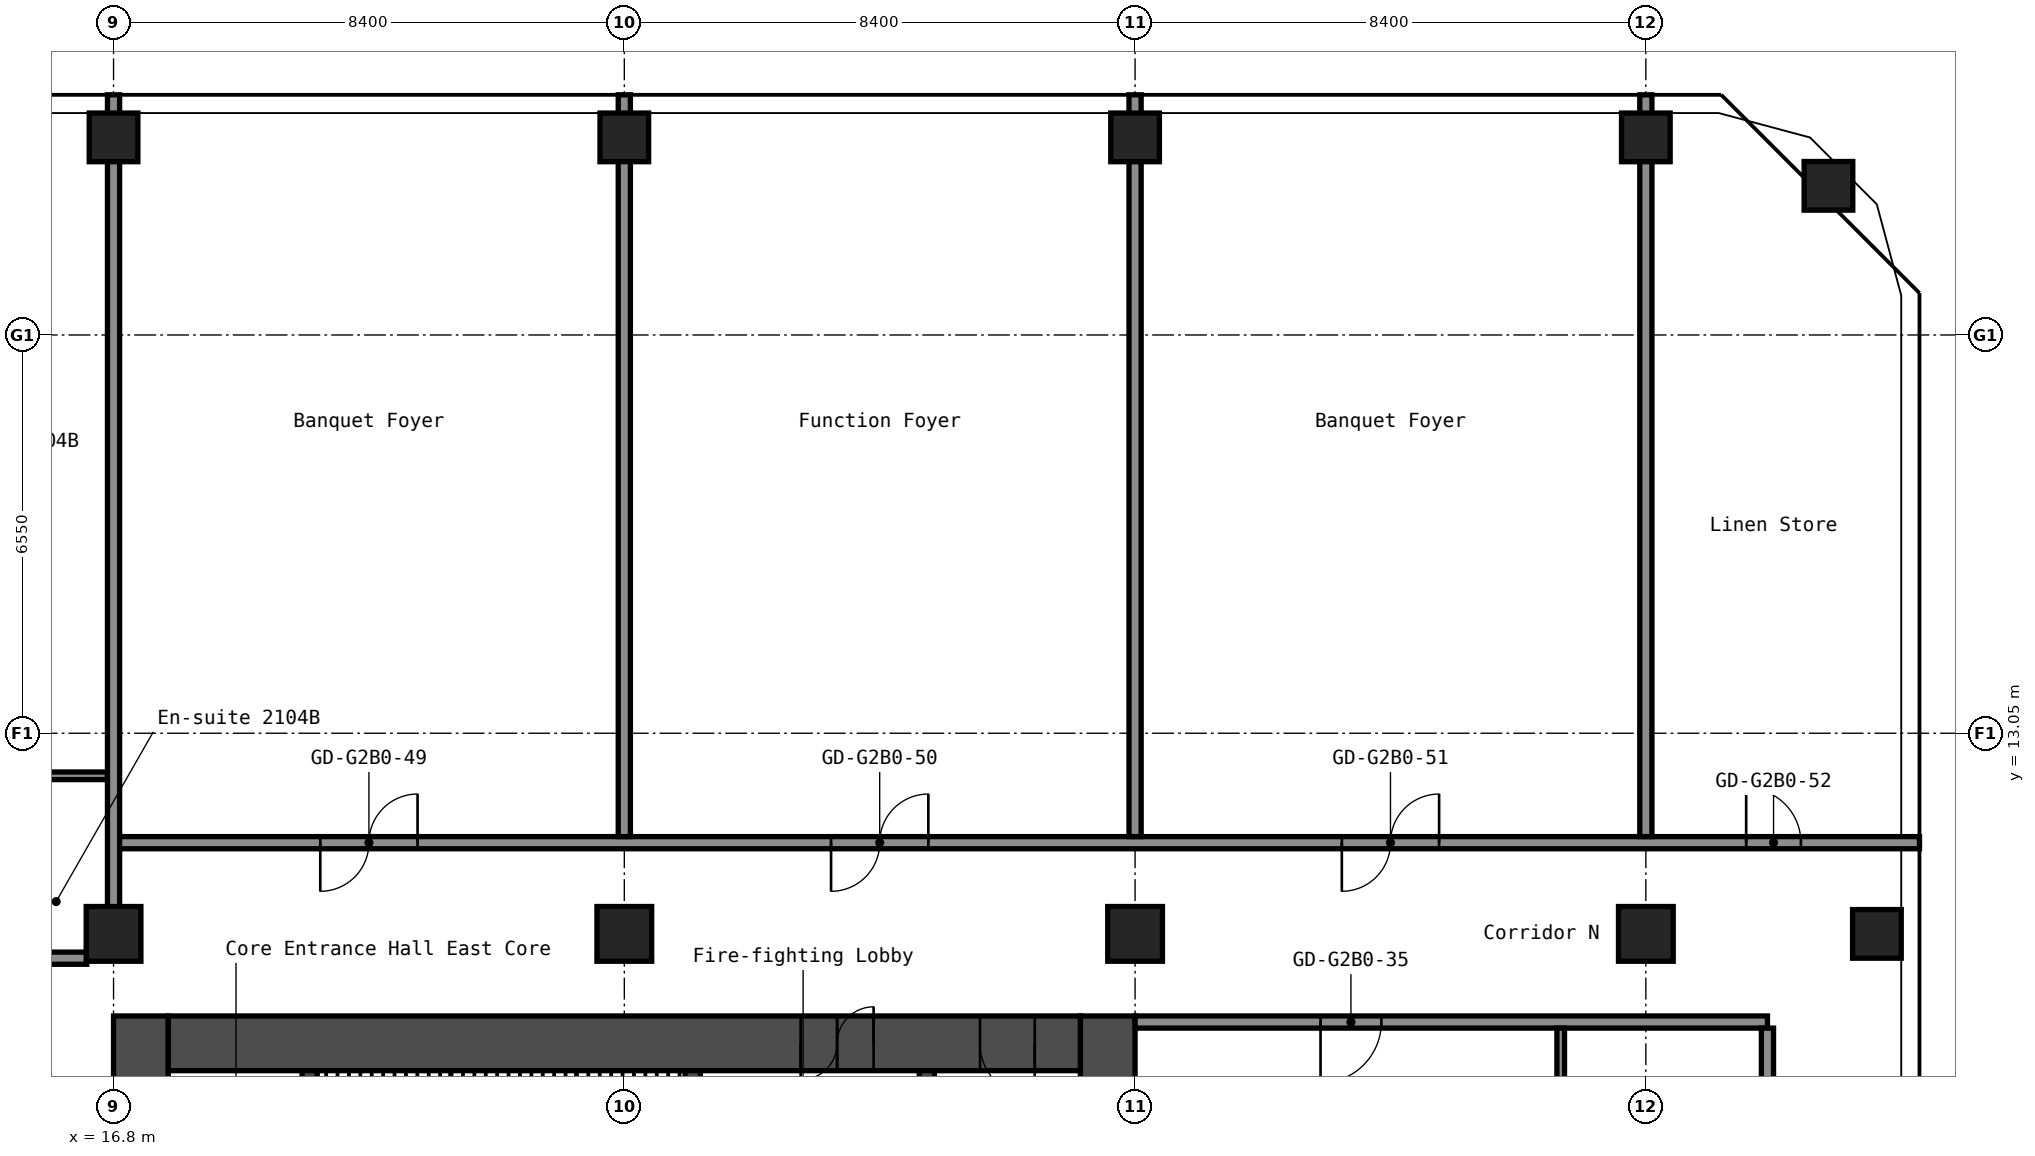
"""IFC4 building model, lengths in metres.
Left out: names, types, materials, properties, quantities, classifications, styles, units other than length and angle.
Written with IfcOpenShell. Run it as: python <this file> out.ifc"""

import sys

from ifc_helpers import new_model, si_unit, direction, frame, frame_2d, origin, origin_2d, place, context, subcontext, project, spatial, rectangle, hollow_rectangle, extrude, element, fill, save


model = new_model("IFC4")
c1 = context("Model", 3, precision=1e-05, world=origin(), true_north=direction((0.0, 1.0)))
c2 = subcontext(c1, "Body", "Model", "MODEL_VIEW")
j1 = project(units=[si_unit("LENGTHUNIT", "METRE"), si_unit("PLANEANGLEUNIT", "RADIAN")], contexts=[c1])
p1 = place(None, origin())
s1 = spatial("IfcSite", under=j1, at=p1, CompositionType="ELEMENT")
p2 = place(p1, origin())
s2 = spatial("IfcBuilding", under=s1, at=p2, CompositionType="ELEMENT")
p3 = place(p2, frame((0.0, 0.0, 78.6)))
s3 = spatial("IfcBuildingStorey", under=s2, at=p3, CompositionType="ELEMENT", Elevation=78.6)
p4 = place(p3, frame((16.8, 9.75, 0.0), z_axis=(0.0, 0.0, 1.0), x_axis=(1.0, 0.0, 0.0)))
e1 = element("IfcColumn", 1, at=p4, inside=s3, PredefinedType="COLUMN", context=c2, shape_type="SweptSolid", body=[
    extrude(hollow_rectangle(XDim=0.9, YDim=0.9, WallThickness=0.036, at=origin_2d()), origin(), (0.0, 0.0, 1.0), 2.8),
])
p5 = place(p3, frame((16.8, 22.85, 0.0), z_axis=(0.0, 0.0, 1.0), x_axis=(1.0, 0.0, 0.0)))
e2 = element("IfcColumn", 2, at=p5, inside=s3, PredefinedType="COLUMN", context=c2, shape_type="SweptSolid", body=[
    extrude(hollow_rectangle(XDim=0.8, YDim=0.8, WallThickness=0.032, at=origin_2d()), origin(), (0.0, 0.0, 1.0), 2.8),
])
p6 = place(p3, frame((25.2, 9.75, 0.0), z_axis=(0.0, 0.0, 1.0), x_axis=(1.0, 0.0, 0.0)))
e3 = element("IfcColumn", 3, at=p6, inside=s3, PredefinedType="COLUMN", context=c2, shape_type="SweptSolid", body=[
    extrude(hollow_rectangle(XDim=0.9, YDim=0.9, WallThickness=0.036, at=origin_2d()), origin(), (0.0, 0.0, 1.0), 2.8),
])
p7 = place(p3, frame((25.2, 22.85, 0.0), z_axis=(0.0, 0.0, 1.0), x_axis=(1.0, 0.0, 0.0)))
e4 = element("IfcColumn", 4, at=p7, inside=s3, PredefinedType="COLUMN", context=c2, shape_type="SweptSolid", body=[
    extrude(hollow_rectangle(XDim=0.8, YDim=0.8, WallThickness=0.032, at=origin_2d()), origin(), (0.0, 0.0, 1.0), 2.8),
])
p8 = place(p3, frame((33.6, 9.75, 0.0), z_axis=(0.0, 0.0, 1.0), x_axis=(1.0, 0.0, 0.0)))
e5 = element("IfcColumn", 5, at=p8, inside=s3, PredefinedType="COLUMN", context=c2, shape_type="SweptSolid", body=[
    extrude(hollow_rectangle(XDim=0.9, YDim=0.9, WallThickness=0.036, at=origin_2d()), origin(), (0.0, 0.0, 1.0), 2.8),
])
p9 = place(p3, frame((33.6, 22.85, 0.0), z_axis=(0.0, 0.0, 1.0), x_axis=(1.0, 0.0, 0.0)))
e6 = element("IfcColumn", 6, at=p9, inside=s3, PredefinedType="COLUMN", context=c2, shape_type="SweptSolid", body=[
    extrude(hollow_rectangle(XDim=0.8, YDim=0.8, WallThickness=0.032, at=origin_2d()), origin(), (0.0, 0.0, 1.0), 2.8),
])
p10 = place(p3, frame((42.0, 9.75, 0.0), z_axis=(0.0, 0.0, 1.0), x_axis=(1.0, 0.0, 0.0)))
e7 = element("IfcColumn", 7, at=p10, inside=s3, PredefinedType="COLUMN", context=c2, shape_type="SweptSolid", body=[
    extrude(hollow_rectangle(XDim=0.9, YDim=0.9, WallThickness=0.036, at=origin_2d()), origin(), (0.0, 0.0, 1.0), 2.8),
])
for number, where, z_axis, x_axis in (
    (8, (42.0, 22.85, 0.0), (0.0, 0.0, 1.0), (1.0, 0.0, 0.0)),
    (9, (45.8, 9.75, 0.0), (0.0, 0.0, 1.0), (1.0, 0.0, 0.0)),
    (10, (45.003, 22.053, 0.0), (0.0, 0.0, 1.0), (1.0, 0.0, 0.0)),
):
    element("IfcColumn", number, at=place(p3, frame(where, z_axis=z_axis, x_axis=x_axis)), inside=s3, PredefinedType="COLUMN", context=c2, shape_type="SweptSolid", body=[
        extrude(hollow_rectangle(XDim=0.8, YDim=0.8, WallThickness=0.032, at=origin_2d()), origin(), (0.0, 0.0, 1.0), 2.8),
    ])
p11 = place(p3, frame((17.25, -8.4, 0.0), z_axis=(0.0, 0.0, 1.0), x_axis=(0.0, 1.0, 0.0)))
e11 = element("IfcWall", 11, at=p11, inside=s3, PredefinedType="SHEAR", context=c2, shape_type="SweptSolid", body=[
    extrude(rectangle(XDim=16.8, YDim=0.9, at=frame_2d((8.4, 0.0))), origin(), (0.0, 0.0, 1.0), 2.8),
])
p12 = place(p11, frame((7.6, 0.0, 0.0)))
e12 = element("IfcOpeningElement", 12, at=p12, cuts=e11, PredefinedType="OPENING", context=c2, shape_type="SweptSolid", body=[
    extrude(rectangle(XDim=1.2, YDim=2.1, at=frame_2d((0.6, 1.05))), frame((0.0, 0.46, 0.0), z_axis=(0.0, -1.0, 0.0), x_axis=(1.0, 0.0, 0.0)), (0.0, 0.0, 1.0), 0.92),
])
p13 = place(p3, frame((33.15, -8.4, 0.0), z_axis=(0.0, 0.0, 1.0), x_axis=(0.0, 1.0, 0.0)))
e13 = element("IfcWall", 13, at=p13, inside=s3, PredefinedType="SHEAR", context=c2, shape_type="SweptSolid", body=[
    extrude(rectangle(XDim=16.8, YDim=0.9, at=frame_2d((8.4, 0.0))), origin(), (0.0, 0.0, 1.0), 2.8),
])
p14 = place(p3, frame((17.7, 7.95, 0.0), z_axis=(0.0, 0.0, 1.0), x_axis=(1.0, 0.0, 0.0)))
e14 = element("IfcWall", 14, at=p14, inside=s3, PredefinedType="SHEAR", context=c2, shape_type="SweptSolid", body=[
    extrude(rectangle(XDim=15.0, YDim=0.9, at=frame_2d((7.5, 0.0))), origin(), (0.0, 0.0, 1.0), 2.8),
])
p15 = place(p14, frame((10.4, 0.0, 0.0)))
e15 = element("IfcOpeningElement", 15, at=p15, cuts=e14, PredefinedType="OPENING", context=c2, shape_type="SweptSolid", body=[
    extrude(rectangle(XDim=1.2, YDim=2.1, at=frame_2d((0.6, 1.05))), frame((0.0, 0.46, 0.0), z_axis=(0.0, -1.0, 0.0), x_axis=(1.0, 0.0, 0.0)), (0.0, 0.0, 1.0), 0.92),
])
p16 = place(p14, frame((13.35, 0.0, 0.0)))
e16 = element("IfcOpeningElement", 16, at=p16, cuts=e14, PredefinedType="OPENING", context=c2, shape_type="SweptSolid", body=[
    extrude(rectangle(XDim=0.9, YDim=2.1, at=frame_2d((0.45, 1.05))), frame((0.0, 0.46, 0.0), z_axis=(0.0, -1.0, 0.0), x_axis=(1.0, 0.0, 0.0)), (0.0, 0.0, 1.0), 0.92),
])
p17 = place(p3, frame((20.025, 1.2, 0.0), z_axis=(0.0, 0.0, 1.0), x_axis=(0.0, 1.0, 0.0)))
e17 = element("IfcWall", 17, at=p17, inside=s3, PredefinedType="SHEAR", context=c2, shape_type="SweptSolid", body=[
    extrude(rectangle(XDim=6.3, YDim=0.25, at=frame_2d((3.15, 0.0))), origin(), (0.0, 0.0, 1.0), 2.8),
])
p18 = place(p3, frame((26.325, 3.75, 0.0), z_axis=(0.0, 0.0, 1.0), x_axis=(0.0, 1.0, 0.0)))
e18 = element("IfcWall", 18, at=p18, inside=s3, PredefinedType="SHEAR", context=c2, shape_type="SweptSolid", body=[
    extrude(rectangle(XDim=3.75, YDim=0.25, at=frame_2d((1.875, 0.0))), origin(), (0.0, 0.0, 1.0), 2.8),
])
p19 = place(p18, frame((1.25, 0.0, 0.0)))
e19 = element("IfcOpeningElement", 19, at=p19, cuts=e18, PredefinedType="OPENING", context=c2, shape_type="SweptSolid", body=[
    extrude(rectangle(XDim=1.2, YDim=2.1, at=frame_2d((0.6, 1.05))), frame((0.0, 0.135, 0.0), z_axis=(0.0, -1.0, 0.0), x_axis=(1.0, 0.0, 0.0)), (0.0, 0.0, 1.0), 0.27),
])
p20 = place(p3, frame((30.175, 1.45, 0.0), z_axis=(0.0, 0.0, 1.0), x_axis=(0.0, 1.0, 0.0)))
e20 = element("IfcWall", 20, at=p20, inside=s3, PredefinedType="SHEAR", context=c2, shape_type="SweptSolid", body=[
    extrude(rectangle(XDim=6.05, YDim=0.25, at=frame_2d((3.025, 0.0))), origin(), (0.0, 0.0, 1.0), 2.8),
])
p21 = place(p20, frame((2.625, 0.0, 0.0)))
e21 = element("IfcOpeningElement", 21, at=p21, cuts=e20, PredefinedType="OPENING", context=c2, shape_type="SweptSolid", body=[
    extrude(rectangle(XDim=1.1, YDim=2.1, at=frame_2d((0.55, 1.05))), frame((0.0, 0.135, 0.0), z_axis=(0.0, -1.0, 0.0), x_axis=(1.0, 0.0, 0.0)), (0.0, 0.0, 1.0), 0.27),
])
p22 = place(p3, frame((33.6, 8.3, 0.0), z_axis=(0.0, 0.0, 1.0), x_axis=(1.0, 0.0, 0.0)))
e22 = element("IfcWall", 22, at=p22, inside=s3, PredefinedType="PARTITIONING", context=c2, shape_type="SweptSolid", body=[
    extrude(rectangle(XDim=10.4, YDim=0.2, at=frame_2d((5.2, 0.0))), origin(), (0.0, 0.0, 1.0), 2.8),
])
p23 = place(p22, frame((3.05, 0.0, 0.0)))
e23 = element("IfcOpeningElement", 23, at=p23, cuts=e22, PredefinedType="OPENING", context=c2, shape_type="SweptSolid", body=[
    extrude(rectangle(XDim=1.0, YDim=2.1, at=frame_2d((0.5, 1.05))), frame((0.0, 0.11, 0.0), z_axis=(0.0, -1.0, 0.0), x_axis=(1.0, 0.0, 0.0)), (0.0, 0.0, 1.0), 0.22),
])
p24 = place(p3, frame((-16.36, 9.35, 0.0), z_axis=(0.0, 0.0, 1.0), x_axis=(1.0, 0.0, 0.0)))
e24 = element("IfcWall", 24, at=p24, inside=s3, PredefinedType="PARTITIONING", context=c2, shape_type="SweptSolid", body=[
    extrude(rectangle(XDim=32.72, YDim=0.2, at=frame_2d((16.36, 0.0))), origin(), (0.0, 0.0, 1.0), 2.8),
])
p25 = place(p24, frame((0.79, 0.0, 0.0)))
e25 = element("IfcOpeningElement", 25, at=p25, cuts=e24, PredefinedType="OPENING", context=c2, shape_type="SweptSolid", body=[
    extrude(rectangle(XDim=0.9, YDim=2.1, at=frame_2d((0.45, 1.05))), frame((0.0, 0.11, 0.0), z_axis=(0.0, -1.0, 0.0), x_axis=(1.0, 0.0, 0.0)), (0.0, 0.0, 1.0), 0.22),
])
p26 = place(p24, frame((4.99, 0.0, 0.0)))
e26 = element("IfcOpeningElement", 26, at=p26, cuts=e24, PredefinedType="OPENING", context=c2, shape_type="SweptSolid", body=[
    extrude(rectangle(XDim=0.9, YDim=2.1, at=frame_2d((0.45, 1.05))), frame((0.0, 0.11, 0.0), z_axis=(0.0, -1.0, 0.0), x_axis=(1.0, 0.0, 0.0)), (0.0, 0.0, 1.0), 0.22),
])
p27 = place(p24, frame((9.275, 0.0, 0.0)))
e27 = element("IfcOpeningElement", 27, at=p27, cuts=e24, PredefinedType="OPENING", context=c2, shape_type="SweptSolid", body=[
    extrude(rectangle(XDim=0.9, YDim=2.1, at=frame_2d((0.45, 1.05))), frame((0.0, 0.11, 0.0), z_axis=(0.0, -1.0, 0.0), x_axis=(1.0, 0.0, 0.0)), (0.0, 0.0, 1.0), 0.22),
])
p28 = place(p24, frame((13.475, 0.0, 0.0)))
e28 = element("IfcOpeningElement", 28, at=p28, cuts=e24, PredefinedType="OPENING", context=c2, shape_type="SweptSolid", body=[
    extrude(rectangle(XDim=0.9, YDim=2.1, at=frame_2d((0.45, 1.05))), frame((0.0, 0.11, 0.0), z_axis=(0.0, -1.0, 0.0), x_axis=(1.0, 0.0, 0.0)), (0.0, 0.0, 1.0), 0.22),
])
p29 = place(p24, frame((19.21, 0.0, 0.0)))
e29 = element("IfcOpeningElement", 29, at=p29, cuts=e24, PredefinedType="OPENING", context=c2, shape_type="SweptSolid", body=[
    extrude(rectangle(XDim=1.0, YDim=2.1, at=frame_2d((0.5, 1.05))), frame((0.0, 0.11, 0.0), z_axis=(0.0, -1.0, 0.0), x_axis=(1.0, 0.0, 0.0)), (0.0, 0.0, 1.0), 0.22),
])
p30 = place(p24, frame((20.91, 0.0, 0.0)))
e30 = element("IfcOpeningElement", 30, at=p30, cuts=e24, PredefinedType="OPENING", context=c2, shape_type="SweptSolid", body=[
    extrude(rectangle(XDim=1.0, YDim=2.1, at=frame_2d((0.5, 1.05))), frame((0.0, 0.11, 0.0), z_axis=(0.0, -1.0, 0.0), x_axis=(1.0, 0.0, 0.0)), (0.0, 0.0, 1.0), 0.22),
])
p31 = place(p24, frame((27.61, 0.0, 0.0)))
e31 = element("IfcOpeningElement", 31, at=p31, cuts=e24, PredefinedType="OPENING", context=c2, shape_type="SweptSolid", body=[
    extrude(rectangle(XDim=1.0, YDim=2.1, at=frame_2d((0.5, 1.05))), frame((0.0, 0.11, 0.0), z_axis=(0.0, -1.0, 0.0), x_axis=(1.0, 0.0, 0.0)), (0.0, 0.0, 1.0), 0.22),
])
p32 = place(p24, frame((29.31, 0.0, 0.0)))
e32 = element("IfcOpeningElement", 32, at=p32, cuts=e24, PredefinedType="OPENING", context=c2, shape_type="SweptSolid", body=[
    extrude(rectangle(XDim=1.0, YDim=2.1, at=frame_2d((0.5, 1.05))), frame((0.0, 0.11, 0.0), z_axis=(0.0, -1.0, 0.0), x_axis=(1.0, 0.0, 0.0)), (0.0, 0.0, 1.0), 0.22),
])
p33 = place(p3, frame((16.8, 11.25, 0.0), z_axis=(0.0, 0.0, 1.0), x_axis=(1.0, 0.0, 0.0)))
e33 = element("IfcWall", 33, at=p33, inside=s3, PredefinedType="PARTITIONING", context=c2, shape_type="SweptSolid", body=[
    extrude(rectangle(XDim=29.7, YDim=0.2, at=frame_2d((14.85, 0.0))), origin(), (0.0, 0.0, 1.0), 2.8),
])
p34 = place(p33, frame((3.4, 0.0, 0.0)))
e34 = element("IfcOpeningElement", 34, at=p34, cuts=e33, PredefinedType="OPENING", context=c2, shape_type="SweptSolid", body=[
    extrude(rectangle(XDim=1.6, YDim=2.1, at=frame_2d((0.8, 1.05))), frame((0.0, 0.11, 0.0), z_axis=(0.0, -1.0, 0.0), x_axis=(1.0, 0.0, 0.0)), (0.0, 0.0, 1.0), 0.22),
])
p35 = place(p33, frame((11.8, 0.0, 0.0)))
e35 = element("IfcOpeningElement", 35, at=p35, cuts=e33, PredefinedType="OPENING", context=c2, shape_type="SweptSolid", body=[
    extrude(rectangle(XDim=1.6, YDim=2.1, at=frame_2d((0.8, 1.05))), frame((0.0, 0.11, 0.0), z_axis=(0.0, -1.0, 0.0), x_axis=(1.0, 0.0, 0.0)), (0.0, 0.0, 1.0), 0.22),
])
p36 = place(p33, frame((20.2, 0.0, 0.0)))
e36 = element("IfcOpeningElement", 36, at=p36, cuts=e33, PredefinedType="OPENING", context=c2, shape_type="SweptSolid", body=[
    extrude(rectangle(XDim=1.6, YDim=2.1, at=frame_2d((0.8, 1.05))), frame((0.0, 0.11, 0.0), z_axis=(0.0, -1.0, 0.0), x_axis=(1.0, 0.0, 0.0)), (0.0, 0.0, 1.0), 0.22),
])
p37 = place(p33, frame((26.85, 0.0, 0.0)))
e37 = element("IfcOpeningElement", 37, at=p37, cuts=e33, PredefinedType="OPENING", context=c2, shape_type="SweptSolid", body=[
    extrude(rectangle(XDim=0.9, YDim=2.1, at=frame_2d((0.45, 1.05))), frame((0.0, 0.11, 0.0), z_axis=(0.0, -1.0, 0.0), x_axis=(1.0, 0.0, 0.0)), (0.0, 0.0, 1.0), 0.22),
])
p38 = place(p3, frame((14.363, 12.35, 0.0), z_axis=(0.0, 0.0, 1.0), x_axis=(1.0, 0.0, 0.0)))
e38 = element("IfcWall", 38, at=p38, inside=s3, PredefinedType="PARTITIONING", context=c2, shape_type="SweptSolid", body=[
    extrude(rectangle(XDim=2.337, YDim=0.125, at=frame_2d((1.169, 0.0))), origin(), (0.0, 0.0, 1.0), 2.8),
])
p39 = place(p3, frame((16.8, 10.19, 0.0), z_axis=(0.0, 0.0, 1.0), x_axis=(0.0, 1.0, 0.0)))
e39 = element("IfcWall", 39, at=p39, inside=s3, PredefinedType="PARTITIONING", context=c2, shape_type="SweptSolid", body=[
    extrude(rectangle(XDim=13.36, YDim=0.2, at=frame_2d((6.68, 0.0))), origin(), (0.0, 0.0, 1.0), 2.8),
])
for number, where, z_axis, x_axis in (
    (40, (25.2, 11.35, 0.0), (0.0, 0.0, 1.0), (0.0, 1.0, 0.0)),
    (41, (33.6, 11.35, 0.0), (0.0, 0.0, 1.0), (0.0, 1.0, 0.0)),
):
    element("IfcWall", number, at=place(p3, frame(where, z_axis=z_axis, x_axis=x_axis)), inside=s3, PredefinedType="PARTITIONING", context=c2, shape_type="SweptSolid", body=[
        extrude(rectangle(XDim=12.2, YDim=0.2, at=frame_2d((6.1, 0.0))), origin(), (0.0, 0.0, 1.0), 2.8),
    ])
p40 = place(p3, frame((40.6, 4.9, 0.0), z_axis=(0.0, 0.0, 1.0), x_axis=(0.0, 1.0, 0.0)))
e42 = element("IfcWall", 42, at=p40, inside=s3, PredefinedType="PARTITIONING", context=c2, shape_type="SweptSolid", body=[
    extrude(rectangle(XDim=3.3, YDim=0.125, at=frame_2d((1.65, 0.0))), origin(), (0.0, 0.0, 1.0), 2.8),
])
p41 = place(p3, frame((42.0, 11.35, 0.0), z_axis=(0.0, 0.0, 1.0), x_axis=(0.0, 1.0, 0.0)))
e43 = element("IfcWall", 43, at=p41, inside=s3, PredefinedType="PARTITIONING", context=c2, shape_type="SweptSolid", body=[
    extrude(rectangle(XDim=12.2, YDim=0.2, at=frame_2d((6.1, 0.0))), origin(), (0.0, 0.0, 1.0), 2.8),
])
p42 = place(p3, frame((44.0, -8.2, 0.0), z_axis=(0.0, 0.0, 1.0), x_axis=(0.0, 1.0, 0.0)))
e44 = element("IfcWall", 44, at=p42, inside=s3, PredefinedType="PARTITIONING", context=c2, shape_type="SweptSolid", body=[
    extrude(rectangle(XDim=16.4, YDim=0.2, at=frame_2d((8.2, 0.0))), origin(), (0.0, 0.0, 1.0), 2.8),
])
p43 = place(p15, origin())
e45 = element("IfcDoor", 45, at=p43, inside=s3, OperationType="DOUBLE_DOOR_SINGLE_SWING", PredefinedType="DOOR", context=c2, shape_type="SweptSolid", body=[
    extrude(rectangle(XDim=1.2, YDim=2.1, at=frame_2d((0.6, 1.05))), frame((0.0, 0.025, 0.0), z_axis=(0.0, -1.0, 0.0), x_axis=(1.0, 0.0, 0.0)), (0.0, 0.0, 1.0), 0.05),
])
fill(e15, e45)
p44 = place(p16, origin())
e46 = element("IfcDoor", 46, at=p44, inside=s3, OperationType="SINGLE_SWING_RIGHT", PredefinedType="DOOR", context=c2, shape_type="SweptSolid", body=[
    extrude(rectangle(XDim=0.9, YDim=2.1, at=frame_2d((0.45, 1.05))), frame((0.0, 0.025, 0.0), z_axis=(0.0, -1.0, 0.0), x_axis=(1.0, 0.0, 0.0)), (0.0, 0.0, 1.0), 0.05),
])
fill(e16, e46)
p45 = place(p23, origin())
e47 = element("IfcDoor", 47, at=p45, inside=s3, OperationType="SINGLE_SWING_LEFT", PredefinedType="DOOR", context=c2, shape_type="SweptSolid", body=[
    extrude(rectangle(XDim=1.0, YDim=2.1, at=frame_2d((0.5, 1.05))), frame((0.0, 0.025, 0.0), z_axis=(0.0, -1.0, 0.0), x_axis=(1.0, 0.0, 0.0)), (0.0, 0.0, 1.0), 0.05),
])
fill(e23, e47)
p46 = place(p34, origin())
e48 = element("IfcDoor", 48, at=p46, inside=s3, OperationType="DOUBLE_DOOR_SINGLE_SWING", PredefinedType="DOOR", context=c2, shape_type="SweptSolid", body=[
    extrude(rectangle(XDim=1.6, YDim=2.1, at=frame_2d((0.8, 1.05))), frame((0.0, 0.025, 0.0), z_axis=(0.0, -1.0, 0.0), x_axis=(1.0, 0.0, 0.0)), (0.0, 0.0, 1.0), 0.05),
])
fill(e34, e48)
p47 = place(p35, origin())
e49 = element("IfcDoor", 49, at=p47, inside=s3, OperationType="DOUBLE_DOOR_SINGLE_SWING", PredefinedType="DOOR", context=c2, shape_type="SweptSolid", body=[
    extrude(rectangle(XDim=1.6, YDim=2.1, at=frame_2d((0.8, 1.05))), frame((0.0, 0.025, 0.0), z_axis=(0.0, -1.0, 0.0), x_axis=(1.0, 0.0, 0.0)), (0.0, 0.0, 1.0), 0.05),
])
fill(e35, e49)
p48 = place(p36, origin())
e50 = element("IfcDoor", 50, at=p48, inside=s3, OperationType="DOUBLE_DOOR_SINGLE_SWING", PredefinedType="DOOR", context=c2, shape_type="SweptSolid", body=[
    extrude(rectangle(XDim=1.6, YDim=2.1, at=frame_2d((0.8, 1.05))), frame((0.0, 0.025, 0.0), z_axis=(0.0, -1.0, 0.0), x_axis=(1.0, 0.0, 0.0)), (0.0, 0.0, 1.0), 0.05),
])
fill(e36, e50)
p49 = place(p37, origin())
e51 = element("IfcDoor", 51, at=p49, inside=s3, OperationType="SINGLE_SWING_RIGHT", PredefinedType="DOOR", context=c2, shape_type="SweptSolid", body=[
    extrude(rectangle(XDim=0.9, YDim=2.1, at=frame_2d((0.45, 1.05))), frame((0.0, 0.025, 0.0), z_axis=(0.0, -1.0, 0.0), x_axis=(1.0, 0.0, 0.0)), (0.0, 0.0, 1.0), 0.05),
])
fill(e37, e51)
save(model, sys.argv[1])
